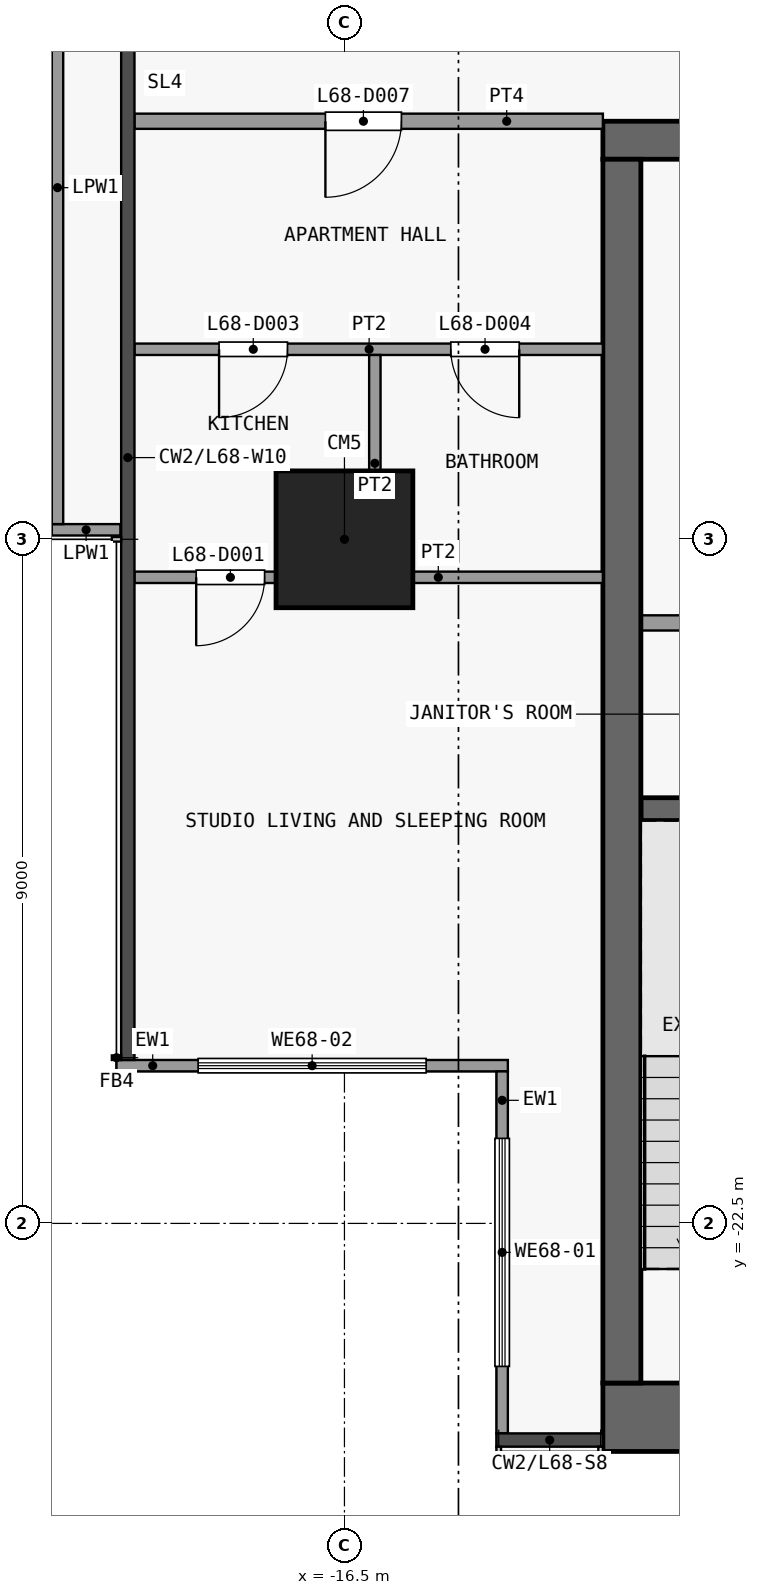
"""IFC4 building model, lengths in metres.
Left out: names, types, materials, properties, quantities, classifications, styles, units other than length and angle.
Written with IfcOpenShell. Run it as: python <this file> out.ifc"""

import sys

from ifc_helpers import new_model, si_unit, direction, frame, frame_2d, origin, origin_2d, place, context, subcontext, project, spatial, rectangle, extrude, element, fill, save


model = new_model("IFC4")
c1 = context("Model", 3, precision=1e-05, world=origin(), true_north=direction((0.0, 1.0)))
c2 = subcontext(c1, "Body", "Model", "MODEL_VIEW")
j1 = project(units=[si_unit("LENGTHUNIT", "METRE"), si_unit("PLANEANGLEUNIT", "RADIAN")], contexts=[c1])
p1 = place(None, origin())
s1 = spatial("IfcSite", under=j1, at=p1, CompositionType="ELEMENT")
p2 = place(p1, origin())
s2 = spatial("IfcBuilding", under=s1, at=p2, CompositionType="ELEMENT")
p3 = place(p2, frame((0.0, 0.0, 269.9)))
s3 = spatial("IfcBuildingStorey", under=s2, at=p3, CompositionType="ELEMENT", Elevation=269.9)
p4 = place(p3, frame((-16.5, -13.5, 0.0), z_axis=(0.0, 0.0, 1.0), x_axis=(1.0, 0.0, 0.0)))
e1 = element("IfcColumn", 1, at=p4, inside=s3, PredefinedType="COLUMN", context=c2, shape_type="SweptSolid", body=[
    extrude(rectangle(XDim=1.8, YDim=1.8, at=origin_2d()), origin(), (0.0, 0.0, 1.0), 3.6),
])
p5 = place(p3, frame((-13.1, -25.05, 0.0), z_axis=(0.0, 0.0, 1.0), x_axis=(1.0, 0.0, 0.0)))
e2 = element("IfcWall", 2, at=p5, inside=s3, PredefinedType="SHEAR", context=c2, shape_type="SweptSolid", body=[
    extrude(rectangle(XDim=26.2, YDim=0.9, at=frame_2d((13.1, 0.0))), origin(), (0.0, 0.0, 1.0), 3.3),
])
p6 = place(p3, frame((-13.1, -8.25, 0.0), z_axis=(0.0, 0.0, 1.0), x_axis=(1.0, 0.0, 0.0)))
e3 = element("IfcWall", 3, at=p6, inside=s3, PredefinedType="SHEAR", context=c2, shape_type="SweptSolid", body=[
    extrude(rectangle(XDim=26.2, YDim=0.5, at=frame_2d((13.1, 0.0))), origin(), (0.0, 0.0, 1.0), 3.3),
])
p7 = place(p6, frame((7.4, 0.0, 0.0)))
e4 = element("IfcOpeningElement", 4, at=p7, cuts=e3, PredefinedType="OPENING", context=c2, shape_type="SweptSolid", body=[
    extrude(rectangle(XDim=1.8, YDim=2.1, at=frame_2d((0.9, 1.05))), frame((0.0, 0.26, 0.0), z_axis=(0.0, -1.0, 0.0), x_axis=(1.0, 0.0, 0.0)), (0.0, 0.0, 1.0), 0.52),
])
p8 = place(p6, frame((17.0, 0.0, 0.0)))
e5 = element("IfcOpeningElement", 5, at=p8, cuts=e3, PredefinedType="OPENING", context=c2, shape_type="SweptSolid", body=[
    extrude(rectangle(XDim=1.8, YDim=2.1, at=frame_2d((0.9, 1.05))), frame((0.0, 0.26, 0.0), z_axis=(0.0, -1.0, 0.0), x_axis=(1.0, 0.0, 0.0)), (0.0, 0.0, 1.0), 0.52),
])
p9 = place(p6, frame((2.325, 0.0, 0.0)))
e6 = element("IfcOpeningElement", 6, at=p9, cuts=e3, PredefinedType="OPENING", context=c2, shape_type="SweptSolid", body=[
    extrude(rectangle(XDim=0.9, YDim=2.1, at=frame_2d((0.45, 1.05))), frame((0.0, 0.26, 0.0), z_axis=(0.0, -1.0, 0.0), x_axis=(1.0, 0.0, 0.0)), (0.0, 0.0, 1.0), 0.52),
])
p10 = place(p6, frame((22.975, 0.0, 0.0)))
e7 = element("IfcOpeningElement", 7, at=p10, cuts=e3, PredefinedType="OPENING", context=c2, shape_type="SweptSolid", body=[
    extrude(rectangle(XDim=0.9, YDim=2.1, at=frame_2d((0.45, 1.05))), frame((0.0, 0.26, 0.0), z_axis=(0.0, -1.0, 0.0), x_axis=(1.0, 0.0, 0.0)), (0.0, 0.0, 1.0), 0.52),
])
p11 = place(p3, frame((-12.85, -24.6, 0.0), z_axis=(0.0, 0.0, 1.0), x_axis=(0.0, 1.0, 0.0)))
e8 = element("IfcWall", 8, at=p11, inside=s3, PredefinedType="SHEAR", context=c2, shape_type="SweptSolid", body=[
    extrude(rectangle(XDim=16.1, YDim=0.5, at=frame_2d((8.05, 0.0))), origin(), (0.0, 0.0, 1.0), 3.3),
])
p12 = place(p3, frame((-12.6, -17.05, 0.0), z_axis=(0.0, 0.0, 1.0), x_axis=(1.0, 0.0, 0.0)))
e9 = element("IfcWall", 9, at=p12, inside=s3, PredefinedType="SHEAR", context=c2, shape_type="SweptSolid", body=[
    extrude(rectangle(XDim=3.1, YDim=0.3, at=frame_2d((1.55, 0.0))), origin(), (0.0, 0.0, 1.0), 3.3),
])
p13 = place(p3, frame((-12.6, -14.6, 0.0), z_axis=(0.0, 0.0, 1.0), x_axis=(1.0, 0.0, 0.0)))
e10 = element("IfcWall", 10, at=p13, inside=s3, PredefinedType="PARTITIONING", context=c2, shape_type="SweptSolid", body=[
    extrude(rectangle(XDim=1.45, YDim=0.2, at=frame_2d((0.725, 0.0))), origin(), (0.0, 0.0, 1.0), 3.3),
])
p14 = place(p3, frame((-14.425, -25.262, 0.0), z_axis=(0.0, 0.0, 1.0), x_axis=(0.0, 1.0, 0.0)))
e11 = element("IfcWall", 11, at=p14, inside=s3, PredefinedType="SOLIDWALL", context=c2, shape_type="SweptSolid", body=[
    extrude(rectangle(XDim=4.762, YDim=0.15, at=frame_2d((2.381, 0.0))), origin(), (0.0, 0.0, 1.0), 3.3),
])
p15 = place(p14, frame((0.881, 0.0, 0.9)))
e12 = element("IfcOpeningElement", 12, at=p15, cuts=e11, PredefinedType="OPENING", context=c2, shape_type="SweptSolid", body=[
    extrude(rectangle(XDim=3.0, YDim=2.4, at=frame_2d((1.5, 1.2))), frame((0.0, 0.085, 0.0), z_axis=(0.0, -1.0, 0.0), x_axis=(1.0, 0.0, 0.0)), (0.0, 0.0, 1.0), 0.17),
])
p16 = place(p3, frame((-14.35, -20.425, 0.0), z_axis=(0.0, 0.0, 1.0), x_axis=(-1.0, 0.0, 0.0)))
e13 = element("IfcWall", 13, at=p16, inside=s3, PredefinedType="SOLIDWALL", context=c2, shape_type="SweptSolid", body=[
    extrude(rectangle(XDim=5.15, YDim=0.15, at=frame_2d((2.575, 0.0))), origin(), (0.0, 0.0, 1.0), 3.3),
])
p17 = place(p16, frame((1.075, 0.0, 0.9)))
e14 = element("IfcOpeningElement", 14, at=p17, cuts=e13, PredefinedType="OPENING", context=c2, shape_type="SweptSolid", body=[
    extrude(rectangle(XDim=3.0, YDim=2.4, at=frame_2d((1.5, 1.2))), frame((0.0, 0.085, 0.0), z_axis=(0.0, -1.0, 0.0), x_axis=(1.0, 0.0, 0.0)), (0.0, 0.0, 1.0), 0.17),
])
p18 = place(p3, frame((-19.448, -13.375, 0.0), z_axis=(0.0, 0.0, 1.0), x_axis=(-1.0, 0.0, 0.0)))
e15 = element("IfcWall", 15, at=p18, inside=s3, PredefinedType="PARAPET", context=c2, shape_type="SweptSolid", body=[
    extrude(rectangle(XDim=0.903, YDim=0.15, at=frame_2d((0.451, 0.0))), origin(), (0.0, 0.0, 1.0), 1.15),
])
p19 = place(p3, frame((-20.275, -13.3, 0.0), z_axis=(0.0, 0.0, 1.0), x_axis=(0.0, 1.0, 0.0)))
e16 = element("IfcWall", 16, at=p19, inside=s3, PredefinedType="PARAPET", context=c2, shape_type="SweptSolid", body=[
    extrude(rectangle(XDim=8.853, YDim=0.15, at=frame_2d((4.426, 0.0))), origin(), (0.0, 0.0, 1.0), 1.15),
])
p20 = place(p3, frame((-19.262, -14.0, 0.0), z_axis=(0.0, 0.0, 1.0), x_axis=(1.0, 0.0, 0.0)))
e17 = element("IfcWall", 17, at=p20, inside=s3, PredefinedType="PARTITIONING", context=c2, shape_type="SweptSolid", body=[
    extrude(rectangle(XDim=6.162, YDim=0.15, at=frame_2d((3.081, 0.0))), origin(), (0.0, 0.0, 1.0), 3.3),
])
p21 = place(p20, frame((0.812, 0.0, 0.0)))
e18 = element("IfcOpeningElement", 18, at=p21, cuts=e17, PredefinedType="OPENING", context=c2, shape_type="SweptSolid", body=[
    extrude(rectangle(XDim=0.9, YDim=2.1, at=frame_2d((0.45, 1.05))), frame((0.0, 0.085, 0.0), z_axis=(0.0, -1.0, 0.0), x_axis=(1.0, 0.0, 0.0)), (0.0, 0.0, 1.0), 0.17),
])
p22 = place(p3, frame((-19.262, -11.0, 0.0), z_axis=(0.0, 0.0, 1.0), x_axis=(1.0, 0.0, 0.0)))
e19 = element("IfcWall", 19, at=p22, inside=s3, PredefinedType="PARTITIONING", context=c2, shape_type="SweptSolid", body=[
    extrude(rectangle(XDim=6.162, YDim=0.15, at=frame_2d((3.081, 0.0))), origin(), (0.0, 0.0, 1.0), 3.3),
])
p23 = place(p22, frame((1.113, 0.0, 0.0)))
e20 = element("IfcOpeningElement", 20, at=p23, cuts=e19, PredefinedType="OPENING", context=c2, shape_type="SweptSolid", body=[
    extrude(rectangle(XDim=0.9, YDim=2.1, at=frame_2d((0.45, 1.05))), frame((0.0, 0.085, 0.0), z_axis=(0.0, -1.0, 0.0), x_axis=(1.0, 0.0, 0.0)), (0.0, 0.0, 1.0), 0.17),
])
p24 = place(p22, frame((4.162, 0.0, 0.0)))
e21 = element("IfcOpeningElement", 21, at=p24, cuts=e19, PredefinedType="OPENING", context=c2, shape_type="SweptSolid", body=[
    extrude(rectangle(XDim=0.9, YDim=2.1, at=frame_2d((0.45, 1.05))), frame((0.0, 0.085, 0.0), z_axis=(0.0, -1.0, 0.0), x_axis=(1.0, 0.0, 0.0)), (0.0, 0.0, 1.0), 0.17),
])
p25 = place(p3, frame((-19.262, -8.0, 0.0), z_axis=(0.0, 0.0, 1.0), x_axis=(1.0, 0.0, 0.0)))
e22 = element("IfcWall", 22, at=p25, inside=s3, PredefinedType="PARTITIONING", context=c2, shape_type="SweptSolid", body=[
    extrude(rectangle(XDim=6.162, YDim=0.2, at=frame_2d((3.081, 0.0))), origin(), (0.0, 0.0, 1.0), 3.3),
])
p26 = place(p25, frame((2.512, 0.0, 0.0)))
e23 = element("IfcOpeningElement", 23, at=p26, cuts=e22, PredefinedType="OPENING", context=c2, shape_type="SweptSolid", body=[
    extrude(rectangle(XDim=1.0, YDim=2.1, at=frame_2d((0.5, 1.05))), frame((0.0, 0.11, 0.0), z_axis=(0.0, -1.0, 0.0), x_axis=(1.0, 0.0, 0.0)), (0.0, 0.0, 1.0), 0.22),
])
p27 = place(p3, frame((-16.1, -13.925, 0.0), z_axis=(0.0, 0.0, 1.0), x_axis=(0.0, 1.0, 0.0)))
e24 = element("IfcWall", 24, at=p27, inside=s3, PredefinedType="PARTITIONING", context=c2, shape_type="SweptSolid", body=[
    extrude(rectangle(XDim=2.85, YDim=0.15, at=frame_2d((1.425, 0.0))), origin(), (0.0, 0.0, 1.0), 3.3),
])
p28 = place(p15, origin())
e25 = element("IfcWindow", 25, at=p28, inside=s3, PartitioningType="SINGLE_PANEL", PredefinedType="WINDOW", context=c2, shape_type="SweptSolid", body=[
    extrude(rectangle(XDim=3.0, YDim=2.4, at=frame_2d((1.5, 1.2))), frame((0.0, 0.03, 0.0), z_axis=(0.0, -1.0, 0.0), x_axis=(1.0, 0.0, 0.0)), (0.0, 0.0, 1.0), 0.06),
])
fill(e12, e25)
p29 = place(p17, origin())
e26 = element("IfcWindow", 26, at=p29, inside=s3, PartitioningType="SINGLE_PANEL", PredefinedType="WINDOW", context=c2, shape_type="SweptSolid", body=[
    extrude(rectangle(XDim=3.0, YDim=2.4, at=frame_2d((1.5, 1.2))), frame((0.0, 0.03, 0.0), z_axis=(0.0, -1.0, 0.0), x_axis=(1.0, 0.0, 0.0)), (0.0, 0.0, 1.0), 0.06),
])
fill(e14, e26)
p30 = place(p21, origin())
e27 = element("IfcDoor", 27, at=p30, inside=s3, OperationType="SINGLE_SWING_LEFT", PredefinedType="DOOR", context=c2, shape_type="SweptSolid", body=[
    extrude(rectangle(XDim=0.9, YDim=2.1, at=frame_2d((0.45, 1.05))), frame((0.0, 0.025, 0.0), z_axis=(0.0, -1.0, 0.0), x_axis=(1.0, 0.0, 0.0)), (0.0, 0.0, 1.0), 0.05),
])
fill(e18, e27)
p31 = place(p23, origin())
e28 = element("IfcDoor", 28, at=p31, inside=s3, OperationType="SINGLE_SWING_LEFT", PredefinedType="DOOR", context=c2, shape_type="SweptSolid", body=[
    extrude(rectangle(XDim=0.9, YDim=2.1, at=frame_2d((0.45, 1.05))), frame((0.0, 0.025, 0.0), z_axis=(0.0, -1.0, 0.0), x_axis=(1.0, 0.0, 0.0)), (0.0, 0.0, 1.0), 0.05),
])
fill(e20, e28)
p32 = place(p24, origin())
e29 = element("IfcDoor", 29, at=p32, inside=s3, OperationType="SINGLE_SWING_RIGHT", PredefinedType="DOOR", context=c2, shape_type="SweptSolid", body=[
    extrude(rectangle(XDim=0.9, YDim=2.1, at=frame_2d((0.45, 1.05))), frame((0.0, 0.025, 0.0), z_axis=(0.0, -1.0, 0.0), x_axis=(1.0, 0.0, 0.0)), (0.0, 0.0, 1.0), 0.05),
])
fill(e21, e29)
p33 = place(p26, origin())
e30 = element("IfcDoor", 30, at=p33, inside=s3, OperationType="SINGLE_SWING_LEFT", PredefinedType="DOOR", context=c2, shape_type="SweptSolid", body=[
    extrude(rectangle(XDim=1.0, YDim=2.1, at=frame_2d((0.5, 1.05))), frame((0.0, 0.025, 0.0), z_axis=(0.0, -1.0, 0.0), x_axis=(1.0, 0.0, 0.0)), (0.0, 0.0, 1.0), 0.05),
])
fill(e23, e30)
save(model, sys.argv[1])
